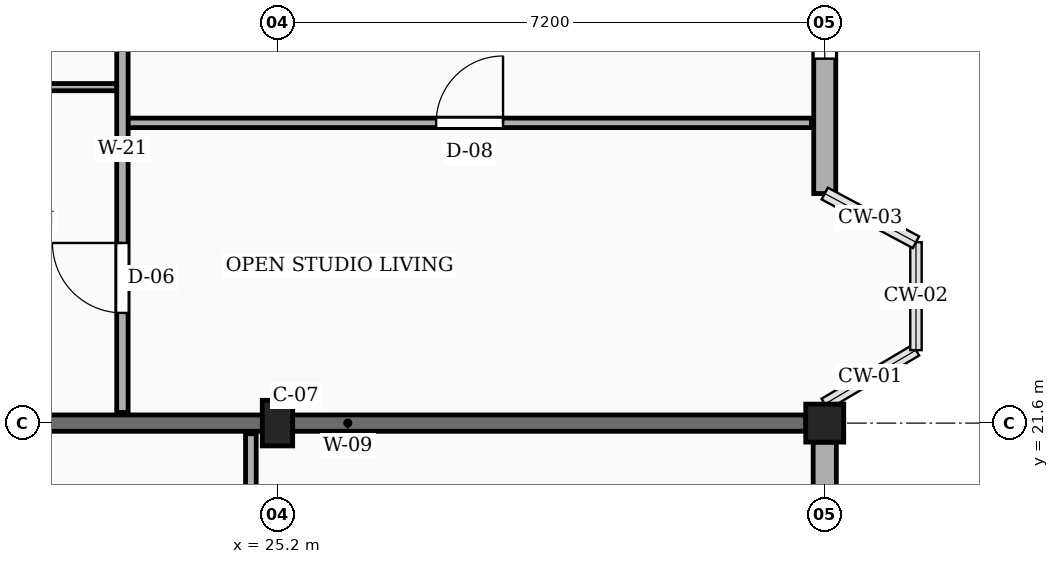
"""IFC4 building model, lengths in metres.
Left out: names, types, materials, properties, quantities, classifications, styles, units other than length and angle.
Written with IfcOpenShell. Run it as: python <this file> out.ifc"""

import sys

from ifc_helpers import new_model, si_unit, direction, frame, frame_2d, origin, origin_2d, place, context, subcontext, project, spatial, rectangle, extrude, element, fill, save


model = new_model("IFC4")
c1 = context("Model", 3, precision=1e-05, world=origin(), true_north=direction((0.0, 1.0)))
c2 = subcontext(c1, "Body", "Model", "MODEL_VIEW")
j1 = project(units=[si_unit("LENGTHUNIT", "METRE"), si_unit("PLANEANGLEUNIT", "RADIAN")], contexts=[c1])
p1 = place(None, origin())
s1 = spatial("IfcSite", under=j1, at=p1, CompositionType="ELEMENT")
p2 = place(p1, origin())
s2 = spatial("IfcBuilding", under=s1, at=p2, CompositionType="ELEMENT")
p3 = place(p2, frame((0.0, 0.0, 26.55)))
s3 = spatial("IfcBuildingStorey", under=s2, at=p3, CompositionType="ELEMENT", Elevation=26.55)
p4 = place(p3, frame((25.2, 21.6, 0.0), z_axis=(0.0, 0.0, 1.0), x_axis=(1.0, 0.0, 0.0)))
e1 = element("IfcColumn", 1, at=p4, inside=s3, PredefinedType="COLUMN", context=c2, shape_type="SweptSolid", body=[
    extrude(rectangle(XDim=0.4, YDim=0.6, at=origin_2d()), origin(), (0.0, 0.0, 1.0), 3.15),
])
p5 = place(p3, frame((32.4, 21.6, 0.0), z_axis=(0.0, 0.0, 1.0), x_axis=(1.0, 0.0, 0.0)))
e2 = element("IfcColumn", 2, at=p5, inside=s3, PredefinedType="COLUMN", context=c2, shape_type="SweptSolid", body=[
    extrude(rectangle(XDim=0.5, YDim=0.5, at=origin_2d()), origin(), (0.0, 0.0, 1.0), 3.15),
])
p6 = place(p3, frame((20.1, 21.6, 0.0), z_axis=(0.0, 0.0, 1.0), x_axis=(1.0, 0.0, 0.0)))
e3 = element("IfcWall", 3, at=p6, inside=s3, PredefinedType="SOLIDWALL", context=c2, shape_type="SweptSolid", body=[
    extrude(rectangle(XDim=12.05, YDim=0.215, at=frame_2d((6.025, 0.0))), origin(), (0.0, 0.0, 1.0), 2.17),
])
p7 = place(p3, frame((32.4, 14.65, 0.0), z_axis=(0.0, 0.0, 1.0), x_axis=(0.0, 1.0, 0.0)))
e4 = element("IfcWall", 4, at=p7, inside=s3, PredefinedType="SOLIDWALL", context=c2, shape_type="SweptSolid", body=[
    extrude(rectangle(XDim=6.7, YDim=0.305, at=frame_2d((3.35, 0.0))), origin(), (0.0, 0.0, 1.0), 2.44),
])
p8 = place(p7, frame((0.45, 0.0, 0.78)))
e5 = element("IfcOpeningElement", 5, at=p8, cuts=e4, PredefinedType="OPENING", context=c2, shape_type="SweptSolid", body=[
    extrude(rectangle(XDim=1.04, YDim=1.26, at=frame_2d((0.52, 0.63))), frame((0.0, 0.163, 0.0), z_axis=(0.0, -1.0, 0.0), x_axis=(1.0, 0.0, 0.0)), (0.0, 0.0, 1.0), 0.325),
])
p9 = place(p7, frame((4.65, 0.0, 0.78)))
e6 = element("IfcOpeningElement", 6, at=p9, cuts=e4, PredefinedType="OPENING", context=c2, shape_type="SweptSolid", body=[
    extrude(rectangle(XDim=1.2, YDim=1.26, at=frame_2d((0.6, 0.63))), frame((0.0, 0.163, 0.0), z_axis=(0.0, -1.0, 0.0), x_axis=(1.0, 0.0, 0.0)), (0.0, 0.0, 1.0), 0.325),
])
p10 = place(p3, frame((32.4, 24.62, 0.0), z_axis=(0.0, 0.0, 1.0), x_axis=(0.0, 1.0, 0.0)))
e7 = element("IfcWall", 7, at=p10, inside=s3, PredefinedType="SOLIDWALL", context=c2, shape_type="SweptSolid", body=[
    extrude(rectangle(XDim=3.93, YDim=0.29, at=frame_2d((1.965, 0.0))), origin(), (0.0, 0.0, 1.0), 2.44),
])
p11 = place(p10, frame((1.775, 0.0, 0.78)))
e8 = element("IfcOpeningElement", 8, at=p11, cuts=e7, PredefinedType="OPENING", context=c2, shape_type="SweptSolid", body=[
    extrude(rectangle(XDim=1.2, YDim=1.26, at=frame_2d((0.6, 0.63))), frame((0.0, 0.155, 0.0), z_axis=(0.0, -1.0, 0.0), x_axis=(1.0, 0.0, 0.0)), (0.0, 0.0, 1.0), 0.31),
])
p12 = place(p3, frame((24.85, 14.54, 0.0), z_axis=(0.0, 0.0, 1.0), x_axis=(0.0, 1.0, 0.0)))
e9 = element("IfcWall", 9, at=p12, inside=s3, PredefinedType="PARTITIONING", context=c2, shape_type="SweptSolid", body=[
    extrude(rectangle(XDim=6.92, YDim=0.14, at=frame_2d((3.46, 0.0))), origin(), (0.0, 0.0, 1.0), 2.305),
])
p13 = place(p12, frame((4.66, 0.0, 0.0)))
e10 = element("IfcOpeningElement", 10, at=p13, cuts=e9, PredefinedType="OPENING", context=c2, shape_type="SweptSolid", body=[
    extrude(rectangle(XDim=0.95, YDim=2.1, at=frame_2d((0.475, 1.05))), frame((0.0, 0.08, 0.0), z_axis=(0.0, -1.0, 0.0), x_axis=(1.0, 0.0, 0.0)), (0.0, 0.0, 1.0), 0.16),
])
p14 = place(p3, frame((23.23, 25.55, 0.0), z_axis=(0.0, 0.0, 1.0), x_axis=(1.0, 0.0, 0.0)))
e11 = element("IfcWall", 11, at=p14, inside=s3, PredefinedType="PARTITIONING", context=c2, shape_type="SweptSolid", body=[
    extrude(rectangle(XDim=8.995, YDim=0.125, at=frame_2d((4.498, 0.0))), origin(), (0.0, 0.0, 1.0), 2.305),
])
p15 = place(p14, frame((4.058, 0.0, 0.0)))
e12 = element("IfcOpeningElement", 12, at=p15, cuts=e11, PredefinedType="OPENING", context=c2, shape_type="SweptSolid", body=[
    extrude(rectangle(XDim=0.88, YDim=2.08, at=frame_2d((0.44, 1.04))), frame((0.0, 0.073, 0.0), z_axis=(0.0, -1.0, 0.0), x_axis=(1.0, 0.0, 0.0)), (0.0, 0.0, 1.0), 0.145),
])
p16 = place(p3, frame((20.19, 26.02, 0.0), z_axis=(0.0, 0.0, 1.0), x_axis=(1.0, 0.0, 0.0)))
e13 = element("IfcWall", 13, at=p16, inside=s3, PredefinedType="PARTITIONING", context=c2, shape_type="SweptSolid", body=[
    extrude(rectangle(XDim=2.9, YDim=0.095, at=frame_2d((1.45, 0.0))), origin(), (0.0, 0.0, 1.0), 2.305),
])
p17 = place(p16, frame((1.015, 0.0, 0.0)))
e14 = element("IfcOpeningElement", 14, at=p17, cuts=e13, PredefinedType="OPENING", context=c2, shape_type="SweptSolid", body=[
    extrude(rectangle(XDim=0.87, YDim=2.05, at=frame_2d((0.435, 1.025))), frame((0.0, 0.058, 0.0), z_axis=(0.0, -1.0, 0.0), x_axis=(1.0, 0.0, 0.0)), (0.0, 0.0, 1.0), 0.115),
])
p18 = place(p3, frame((23.16, 21.74, 0.0), z_axis=(0.0, 0.0, 1.0), x_axis=(0.0, 1.0, 0.0)))
e15 = element("IfcWall", 15, at=p18, inside=s3, PredefinedType="PARTITIONING", context=c2, shape_type="SweptSolid", body=[
    extrude(rectangle(XDim=6.92, YDim=0.15, at=frame_2d((3.46, 0.0))), origin(), (0.0, 0.0, 1.0), 2.305),
])
p19 = place(p18, frame((1.31, 0.0, 0.0)))
e16 = element("IfcOpeningElement", 16, at=p19, cuts=e15, PredefinedType="OPENING", context=c2, shape_type="SweptSolid", body=[
    extrude(rectangle(XDim=0.92, YDim=2.1, at=frame_2d((0.46, 1.05))), frame((0.0, 0.085, 0.0), z_axis=(0.0, -1.0, 0.0), x_axis=(1.0, 0.0, 0.0)), (0.0, 0.0, 1.0), 0.17),
])
p20 = place(p11, origin())
e17 = element("IfcWindow", 17, at=p20, inside=s3, PartitioningType="SINGLE_PANEL", PredefinedType="WINDOW", context=c2, shape_type="SweptSolid", body=[
    extrude(rectangle(XDim=1.2, YDim=1.26, at=frame_2d((0.6, 0.63))), frame((0.0, 0.03, 0.0), z_axis=(0.0, -1.0, 0.0), x_axis=(1.0, 0.0, 0.0)), (0.0, 0.0, 1.0), 0.06),
])
fill(e8, e17)
p21 = place(p15, origin())
e18 = element("IfcDoor", 18, at=p21, inside=s3, OperationType="SINGLE_SWING_RIGHT", PredefinedType="DOOR", context=c2, shape_type="SweptSolid", body=[
    extrude(rectangle(XDim=0.88, YDim=2.08, at=frame_2d((0.44, 1.04))), frame((0.0, 0.025, 0.0), z_axis=(0.0, -1.0, 0.0), x_axis=(1.0, 0.0, 0.0)), (0.0, 0.0, 1.0), 0.05),
])
fill(e12, e18)
p22 = place(p19, origin())
e19 = element("IfcDoor", 19, at=p22, inside=s3, OperationType="SINGLE_SWING_RIGHT", PredefinedType="DOOR", context=c2, shape_type="SweptSolid", body=[
    extrude(rectangle(XDim=0.92, YDim=2.1, at=frame_2d((0.46, 1.05))), frame((0.0, 0.025, 0.0), z_axis=(0.0, -1.0, 0.0), x_axis=(1.0, 0.0, 0.0)), (0.0, 0.0, 1.0), 0.05),
])
fill(e16, e19)
save(model, sys.argv[1])
